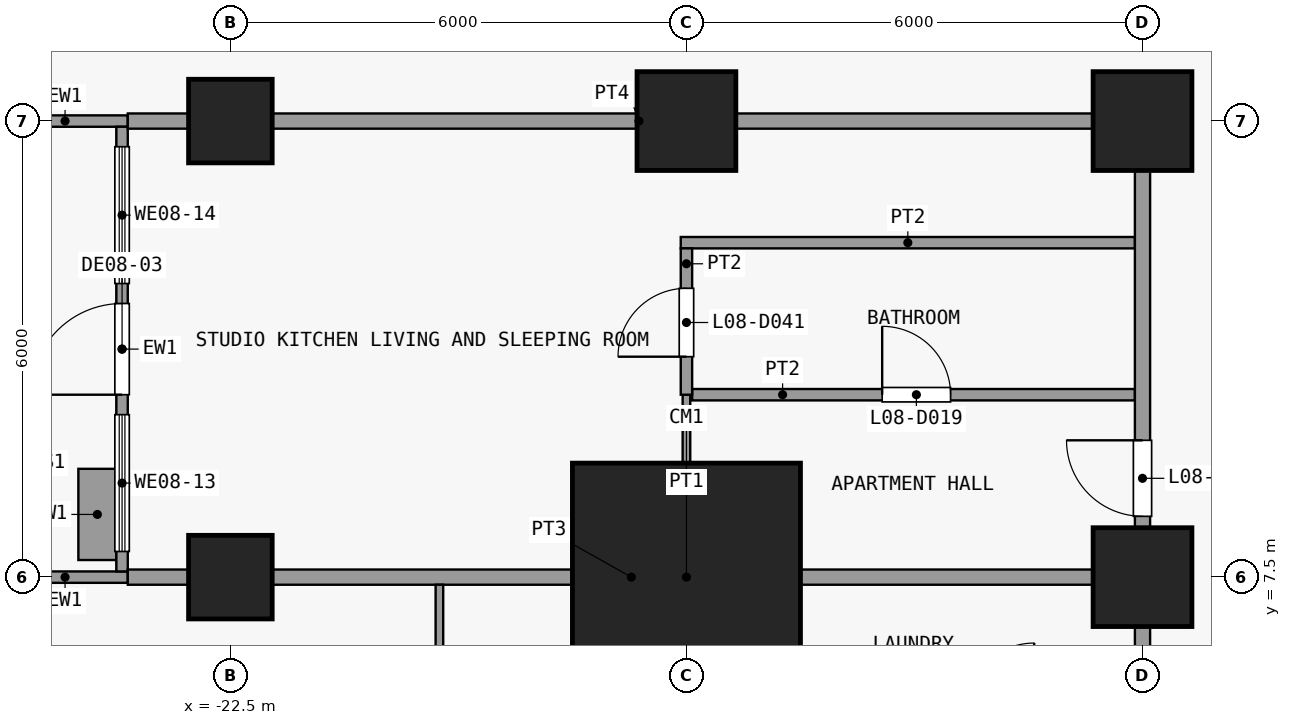
"""IFC4 building model, lengths in metres.
Left out: names, types, materials, properties, quantities, classifications, styles, units other than length and angle.
Written with IfcOpenShell. Run it as: python <this file> out.ifc"""

import sys

from ifc_helpers import new_model, si_unit, direction, frame, frame_2d, origin, origin_2d, place, context, subcontext, project, spatial, rectangle, extrude, element, fill, save


model = new_model("IFC4")
c1 = context("Model", 3, precision=1e-05, world=origin(), true_north=direction((0.0, 1.0)))
c2 = subcontext(c1, "Body", "Model", "MODEL_VIEW")
j1 = project(units=[si_unit("LENGTHUNIT", "METRE"), si_unit("PLANEANGLEUNIT", "RADIAN")], contexts=[c1])
p1 = place(None, origin())
s1 = spatial("IfcSite", under=j1, at=p1, CompositionType="ELEMENT")
p2 = place(p1, origin())
s2 = spatial("IfcBuilding", under=s1, at=p2, CompositionType="ELEMENT")
p3 = place(p2, frame((0.0, 0.0, 39.7)))
s3 = spatial("IfcBuildingStorey", under=s2, at=p3, CompositionType="ELEMENT", Elevation=39.7)
for number, where, z_axis, x_axis in (
    (1, (-22.5, 7.5, 0.0), (0.0, 0.0, 1.0), (1.0, 0.0, 0.0)),
    (2, (-22.5, 13.5, 0.0), (0.0, 0.0, 1.0), (1.0, 0.0, 0.0)),
):
    element("IfcColumn", number, at=place(p3, frame(where, z_axis=z_axis, x_axis=x_axis)), inside=s3, PredefinedType="COLUMN", context=c2, shape_type="SweptSolid", body=[
        extrude(rectangle(XDim=1.1, YDim=1.1, at=origin_2d()), origin(), (0.0, 0.0, 1.0), 3.6),
    ])
p4 = place(p3, frame((-16.5, 7.5, 0.0), z_axis=(0.0, 0.0, 1.0), x_axis=(1.0, 0.0, 0.0)))
e3 = element("IfcColumn", 3, at=p4, inside=s3, PredefinedType="COLUMN", context=c2, shape_type="SweptSolid", body=[
    extrude(rectangle(XDim=3.0, YDim=3.0, at=origin_2d()), origin(), (0.0, 0.0, 1.0), 3.6),
])
for number, where, z_axis, x_axis in (
    (4, (-16.5, 13.5, 0.0), (0.0, 0.0, 1.0), (1.0, 0.0, 0.0)),
    (5, (-10.5, 7.5, 0.0), (0.0, 0.0, 1.0), (1.0, 0.0, 0.0)),
    (6, (-10.5, 13.5, 0.0), (0.0, 0.0, 1.0), (1.0, 0.0, 0.0)),
):
    element("IfcColumn", number, at=place(p3, frame(where, z_axis=z_axis, x_axis=x_axis)), inside=s3, PredefinedType="COLUMN", context=c2, shape_type="SweptSolid", body=[
        extrude(rectangle(XDim=1.3, YDim=1.3, at=origin_2d()), origin(), (0.0, 0.0, 1.0), 3.6),
    ])
for number, where, z_axis, x_axis in (
    (7, (-23.85, 7.5, 0.0), (0.0, 0.0, 1.0), (-1.0, 0.0, 0.0)),
    (8, (-23.85, 13.5, 0.0), (0.0, 0.0, 1.0), (-1.0, 0.0, 0.0)),
):
    element("IfcWall", number, at=place(p3, frame(where, z_axis=z_axis, x_axis=x_axis)), inside=s3, PredefinedType="SOLIDWALL", context=c2, shape_type="SweptSolid", body=[
        extrude(rectangle(XDim=1.65, YDim=0.15, at=frame_2d((0.825, 0.0))), origin(), (0.0, 0.0, 1.0), 3.3),
    ])
p5 = place(p3, frame((-23.925, 7.575, 0.0), z_axis=(0.0, 0.0, 1.0), x_axis=(0.0, 1.0, 0.0)))
e9 = element("IfcWall", 9, at=p5, inside=s3, PredefinedType="SOLIDWALL", context=c2, shape_type="SweptSolid", body=[
    extrude(rectangle(XDim=5.85, YDim=0.15, at=frame_2d((2.925, 0.0))), origin(), (0.0, 0.0, 1.0), 3.3),
])
p6 = place(p5, frame((2.325, 0.0, 0.0)))
e10 = element("IfcOpeningElement", 10, at=p6, cuts=e9, PredefinedType="OPENING", context=c2, shape_type="SweptSolid", body=[
    extrude(rectangle(XDim=1.2, YDim=2.4, at=frame_2d((0.6, 1.2))), frame((0.0, 0.085, 0.0), z_axis=(0.0, -1.0, 0.0), x_axis=(1.0, 0.0, 0.0)), (0.0, 0.0, 1.0), 0.17),
])
p7 = place(p5, frame((0.262, 0.0, 0.9)))
e11 = element("IfcOpeningElement", 11, at=p7, cuts=e9, PredefinedType="OPENING", context=c2, shape_type="SweptSolid", body=[
    extrude(rectangle(XDim=1.8, YDim=2.1, at=frame_2d((0.9, 1.05))), frame((0.0, 0.085, 0.0), z_axis=(0.0, -1.0, 0.0), x_axis=(1.0, 0.0, 0.0)), (0.0, 0.0, 1.0), 0.17),
])
p8 = place(p5, frame((3.788, 0.0, 0.9)))
e12 = element("IfcOpeningElement", 12, at=p8, cuts=e9, PredefinedType="OPENING", context=c2, shape_type="SweptSolid", body=[
    extrude(rectangle(XDim=1.8, YDim=2.1, at=frame_2d((0.9, 1.05))), frame((0.0, 0.085, 0.0), z_axis=(0.0, -1.0, 0.0), x_axis=(1.0, 0.0, 0.0)), (0.0, 0.0, 1.0), 0.17),
])
p9 = place(p3, frame((-24.25, 7.725, 0.0), z_axis=(0.0, 0.0, 1.0), x_axis=(0.0, 1.0, 0.0)))
e13 = element("IfcWall", 13, at=p9, inside=s3, PredefinedType="USERDEFINED", context=c2, shape_type="SweptSolid", body=[
    extrude(rectangle(XDim=1.2, YDim=0.5, at=frame_2d((0.6, 0.0))), origin(), (0.0, 0.0, 1.0), 0.9),
])
p10 = place(p3, frame((-23.85, 7.5, 0.0), z_axis=(0.0, 0.0, 1.0), x_axis=(1.0, 0.0, 0.0)))
e14 = element("IfcWall", 14, at=p10, inside=s3, PredefinedType="PARTITIONING", context=c2, shape_type="SweptSolid", body=[
    extrude(rectangle(XDim=13.25, YDim=0.2, at=frame_2d((6.625, 0.0))), origin(), (0.0, 0.0, 1.0), 3.3),
])
p11 = place(p3, frame((-16.425, 9.9, 0.0), z_axis=(0.0, 0.0, 1.0), x_axis=(1.0, 0.0, 0.0)))
e15 = element("IfcWall", 15, at=p11, inside=s3, PredefinedType="PARTITIONING", context=c2, shape_type="SweptSolid", body=[
    extrude(rectangle(XDim=5.825, YDim=0.15, at=frame_2d((2.913, 0.0))), origin(), (0.0, 0.0, 1.0), 3.3),
])
p12 = place(p11, frame((2.5, 0.0, 0.0)))
e16 = element("IfcOpeningElement", 16, at=p12, cuts=e15, PredefinedType="OPENING", context=c2, shape_type="SweptSolid", body=[
    extrude(rectangle(XDim=0.9, YDim=2.1, at=frame_2d((0.45, 1.05))), frame((0.0, 0.085, 0.0), z_axis=(0.0, -1.0, 0.0), x_axis=(1.0, 0.0, 0.0)), (0.0, 0.0, 1.0), 0.17),
])
p13 = place(p3, frame((-16.575, 11.9, 0.0), z_axis=(0.0, 0.0, 1.0), x_axis=(1.0, 0.0, 0.0)))
e17 = element("IfcWall", 17, at=p13, inside=s3, PredefinedType="PARTITIONING", context=c2, shape_type="SweptSolid", body=[
    extrude(rectangle(XDim=5.975, YDim=0.15, at=frame_2d((2.987, 0.0))), origin(), (0.0, 0.0, 1.0), 3.3),
])
p14 = place(p3, frame((-23.85, 13.5, 0.0), z_axis=(0.0, 0.0, 1.0), x_axis=(1.0, 0.0, 0.0)))
e18 = element("IfcWall", 18, at=p14, inside=s3, PredefinedType="PARTITIONING", context=c2, shape_type="SweptSolid", body=[
    extrude(rectangle(XDim=13.45, YDim=0.2, at=frame_2d((6.725, 0.0))), origin(), (0.0, 0.0, 1.0), 3.3),
])
p15 = place(p3, frame((-19.75, 1.55, 0.0), z_axis=(0.0, 0.0, 1.0), x_axis=(0.0, 1.0, 0.0)))
e19 = element("IfcWall", 19, at=p15, inside=s3, PredefinedType="PARTITIONING", context=c2, shape_type="SweptSolid", body=[
    extrude(rectangle(XDim=5.85, YDim=0.1, at=frame_2d((2.925, 0.0))), origin(), (0.0, 0.0, 1.0), 3.3),
])
p16 = place(p15, frame((2.5, 0.0, 0.0)))
e20 = element("IfcOpeningElement", 20, at=p16, cuts=e19, PredefinedType="OPENING", context=c2, shape_type="SweptSolid", body=[
    extrude(rectangle(XDim=0.9, YDim=2.1, at=frame_2d((0.45, 1.05))), frame((0.0, 0.06, 0.0), z_axis=(0.0, -1.0, 0.0), x_axis=(1.0, 0.0, 0.0)), (0.0, 0.0, 1.0), 0.12),
])
p17 = place(p3, frame((-16.5, 7.6, 0.0), z_axis=(0.0, 0.0, 1.0), x_axis=(0.0, 1.0, 0.0)))
e21 = element("IfcWall", 21, at=p17, inside=s3, PredefinedType="PARTITIONING", context=c2, shape_type="SweptSolid", body=[
    extrude(rectangle(XDim=2.3, YDim=0.1, at=frame_2d((1.15, 0.0))), origin(), (0.0, 0.0, 1.0), 3.3),
])
p18 = place(p3, frame((-16.5, 0.4, 0.0), z_axis=(0.0, 0.0, 1.0), x_axis=(0.0, 1.0, 0.0)))
e22 = element("IfcWall", 22, at=p18, inside=s3, PredefinedType="PARTITIONING", context=c2, shape_type="SweptSolid", body=[
    extrude(rectangle(XDim=7.0, YDim=0.15, at=frame_2d((3.5, 0.0))), origin(), (0.0, 0.0, 1.0), 3.3),
])
p19 = place(p3, frame((-16.5, 9.9, 0.0), z_axis=(0.0, 0.0, 1.0), x_axis=(0.0, 1.0, 0.0)))
e23 = element("IfcWall", 23, at=p19, inside=s3, PredefinedType="PARTITIONING", context=c2, shape_type="SweptSolid", body=[
    extrude(rectangle(XDim=1.925, YDim=0.15, at=frame_2d((0.962, 0.0))), origin(), (0.0, 0.0, 1.0), 3.3),
])
p20 = place(p19, frame((0.5, 0.0, 0.0)))
e24 = element("IfcOpeningElement", 24, at=p20, cuts=e23, PredefinedType="OPENING", context=c2, shape_type="SweptSolid", body=[
    extrude(rectangle(XDim=0.9, YDim=2.1, at=frame_2d((0.45, 1.05))), frame((0.0, 0.085, 0.0), z_axis=(0.0, -1.0, 0.0), x_axis=(1.0, 0.0, 0.0)), (0.0, 0.0, 1.0), 0.17),
])
p21 = place(p3, frame((-10.5, -4.4, 0.0), z_axis=(0.0, 0.0, 1.0), x_axis=(0.0, 1.0, 0.0)))
e25 = element("IfcWall", 25, at=p21, inside=s3, PredefinedType="PARTITIONING", context=c2, shape_type="SweptSolid", body=[
    extrude(rectangle(XDim=17.8, YDim=0.2, at=frame_2d((8.9, 0.0))), origin(), (0.0, 0.0, 1.0), 3.3),
])
p22 = place(p21, frame((3.1, 0.0, 0.0)))
e26 = element("IfcOpeningElement", 26, at=p22, cuts=e25, PredefinedType="OPENING", context=c2, shape_type="SweptSolid", body=[
    extrude(rectangle(XDim=1.0, YDim=2.1, at=frame_2d((0.5, 1.05))), frame((0.0, 0.11, 0.0), z_axis=(0.0, -1.0, 0.0), x_axis=(1.0, 0.0, 0.0)), (0.0, 0.0, 1.0), 0.22),
])
p23 = place(p21, frame((12.7, 0.0, 0.0)))
e27 = element("IfcOpeningElement", 27, at=p23, cuts=e25, PredefinedType="OPENING", context=c2, shape_type="SweptSolid", body=[
    extrude(rectangle(XDim=1.0, YDim=2.1, at=frame_2d((0.5, 1.05))), frame((0.0, 0.11, 0.0), z_axis=(0.0, -1.0, 0.0), x_axis=(1.0, 0.0, 0.0)), (0.0, 0.0, 1.0), 0.22),
])
p24 = place(p6, origin())
e28 = element("IfcDoor", 28, at=p24, inside=s3, OperationType="SINGLE_SWING_LEFT", PredefinedType="DOOR", context=c2, shape_type="SweptSolid", body=[
    extrude(rectangle(XDim=1.2, YDim=2.4, at=frame_2d((0.6, 1.2))), frame((0.0, 0.025, 0.0), z_axis=(0.0, -1.0, 0.0), x_axis=(1.0, 0.0, 0.0)), (0.0, 0.0, 1.0), 0.05),
])
fill(e10, e28)
p25 = place(p7, origin())
e29 = element("IfcWindow", 29, at=p25, inside=s3, PartitioningType="SINGLE_PANEL", PredefinedType="WINDOW", context=c2, shape_type="SweptSolid", body=[
    extrude(rectangle(XDim=1.8, YDim=2.1, at=frame_2d((0.9, 1.05))), frame((0.0, 0.03, 0.0), z_axis=(0.0, -1.0, 0.0), x_axis=(1.0, 0.0, 0.0)), (0.0, 0.0, 1.0), 0.06),
])
fill(e11, e29)
p26 = place(p8, origin())
e30 = element("IfcWindow", 30, at=p26, inside=s3, PartitioningType="SINGLE_PANEL", PredefinedType="WINDOW", context=c2, shape_type="SweptSolid", body=[
    extrude(rectangle(XDim=1.8, YDim=2.1, at=frame_2d((0.9, 1.05))), frame((0.0, 0.03, 0.0), z_axis=(0.0, -1.0, 0.0), x_axis=(1.0, 0.0, 0.0)), (0.0, 0.0, 1.0), 0.06),
])
fill(e12, e30)
p27 = place(p12, origin())
e31 = element("IfcDoor", 31, at=p27, inside=s3, OperationType="SINGLE_SWING_RIGHT", PredefinedType="DOOR", context=c2, shape_type="SweptSolid", body=[
    extrude(rectangle(XDim=0.9, YDim=2.1, at=frame_2d((0.45, 1.05))), frame((0.0, 0.025, 0.0), z_axis=(0.0, -1.0, 0.0), x_axis=(1.0, 0.0, 0.0)), (0.0, 0.0, 1.0), 0.05),
])
fill(e16, e31)
p28 = place(p20, origin())
e32 = element("IfcDoor", 32, at=p28, inside=s3, OperationType="SINGLE_SWING_RIGHT", PredefinedType="DOOR", context=c2, shape_type="SweptSolid", body=[
    extrude(rectangle(XDim=0.9, YDim=2.1, at=frame_2d((0.45, 1.05))), frame((0.0, 0.025, 0.0), z_axis=(0.0, -1.0, 0.0), x_axis=(1.0, 0.0, 0.0)), (0.0, 0.0, 1.0), 0.05),
])
fill(e24, e32)
p29 = place(p23, origin())
e33 = element("IfcDoor", 33, at=p29, inside=s3, OperationType="SINGLE_SWING_LEFT", PredefinedType="DOOR", context=c2, shape_type="SweptSolid", body=[
    extrude(rectangle(XDim=1.0, YDim=2.1, at=frame_2d((0.5, 1.05))), frame((0.0, 0.025, 0.0), z_axis=(0.0, -1.0, 0.0), x_axis=(1.0, 0.0, 0.0)), (0.0, 0.0, 1.0), 0.05),
])
fill(e27, e33)
save(model, sys.argv[1])
